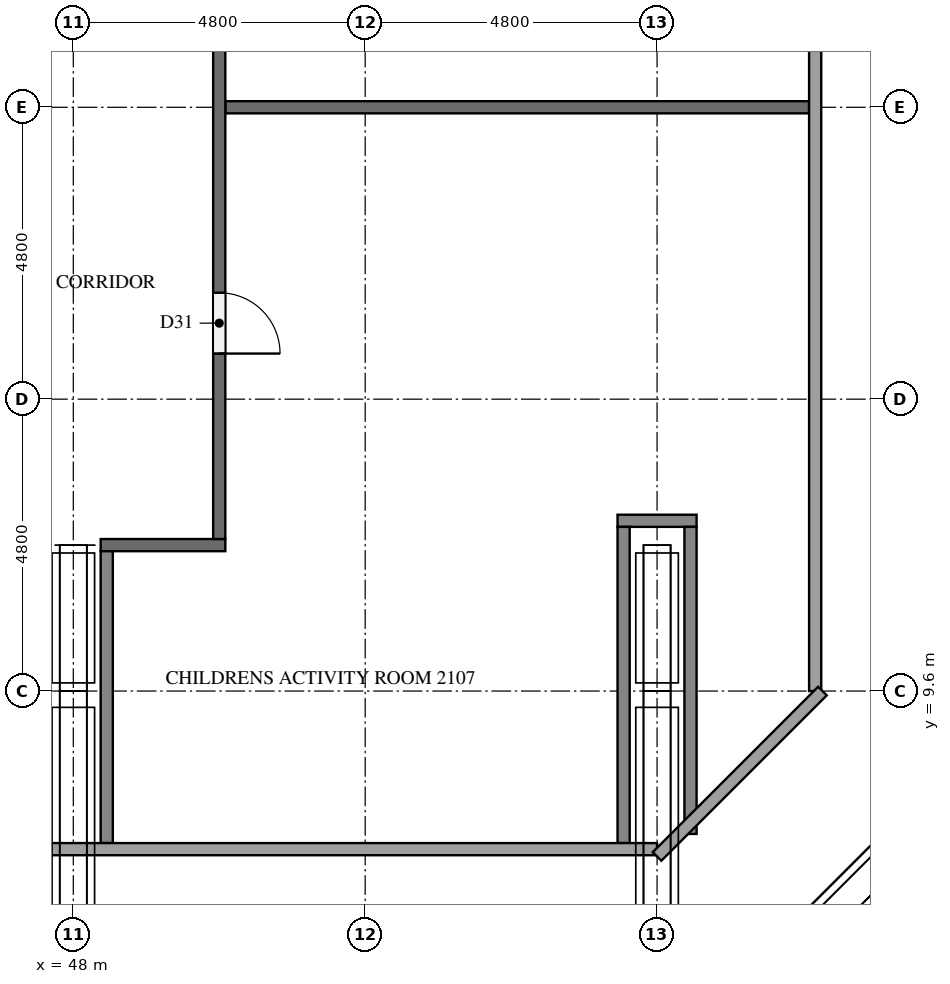
"""IFC4 building model, lengths in metres.
Left out: names, types, materials, properties, quantities, classifications, styles, units other than length and angle.
Written with IfcOpenShell. Run it as: python <this file> out.ifc"""

import sys

from ifc_helpers import new_model, si_unit, direction, frame, frame_2d, origin, place, context, subcontext, project, spatial, rectangle, extrude, element, fill, save


model = new_model("IFC4")
c1 = context("Model", 3, precision=1e-05, world=origin(), true_north=direction((0.0, 1.0)))
c2 = subcontext(c1, "Body", "Model", "MODEL_VIEW")
j1 = project(units=[si_unit("LENGTHUNIT", "METRE"), si_unit("PLANEANGLEUNIT", "RADIAN")], contexts=[c1])
p1 = place(None, origin())
s1 = spatial("IfcSite", under=j1, at=p1, CompositionType="ELEMENT")
p2 = place(p1, origin())
s2 = spatial("IfcBuilding", under=s1, at=p2, CompositionType="ELEMENT")
p3 = place(p2, frame((0.0, 0.0, 83.8)))
s3 = spatial("IfcBuildingStorey", under=s2, at=p3, CompositionType="ELEMENT", Elevation=83.8)
p4 = place(p3, frame((48.45, 12.0, 0.0), z_axis=(0.0, 0.0, 1.0), x_axis=(1.0, 0.0, 0.0)))
e1 = element("IfcWall", 1, at=p4, inside=s3, PredefinedType="PARTITIONING", context=c2, shape_type="SweptSolid", body=[
    extrude(rectangle(XDim=2.05, YDim=0.2, at=frame_2d((1.025, 0.0))), origin(), (0.0, 0.0, 1.0), 5.1),
])
p5 = place(p3, frame((56.95, 12.4, 0.0), z_axis=(0.0, 0.0, 1.0), x_axis=(1.0, 0.0, 0.0)))
e2 = element("IfcWall", 2, at=p5, inside=s3, PredefinedType="PARTITIONING", context=c2, shape_type="SweptSolid", body=[
    extrude(rectangle(XDim=1.3, YDim=0.2, at=frame_2d((0.65, 0.0))), origin(), (0.0, 0.0, 1.0), 5.1),
])
p6 = place(p3, frame((50.5, 19.2, 0.0), z_axis=(0.0, 0.0, 1.0), x_axis=(1.0, 0.0, 0.0)))
e3 = element("IfcWall", 3, at=p6, inside=s3, PredefinedType="PARTITIONING", context=c2, shape_type="SweptSolid", body=[
    extrude(rectangle(XDim=9.6, YDim=0.2, at=frame_2d((4.8, 0.0))), origin(), (0.0, 0.0, 1.0), 5.1),
])
p7 = place(p3, frame((48.55, 7.1, 0.0), z_axis=(0.0, 0.0, 1.0), x_axis=(0.0, 1.0, 0.0)))
e4 = element("IfcWall", 4, at=p7, inside=s3, PredefinedType="PARTITIONING", context=c2, shape_type="SweptSolid", body=[
    extrude(rectangle(XDim=4.8, YDim=0.2, at=frame_2d((2.4, 0.0))), origin(), (0.0, 0.0, 1.0), 5.1),
])
p8 = place(p3, frame((50.4, 40.7, 0.0), z_axis=(0.0, 0.0, 1.0), x_axis=(0.0, -1.0, 0.0)))
e5 = element("IfcWall", 5, at=p8, inside=s3, PredefinedType="PARTITIONING", context=c2, shape_type="SweptSolid", body=[
    extrude(rectangle(XDim=28.6, YDim=0.2, at=frame_2d((14.3, 0.0))), origin(), (0.0, 0.0, 1.0), 5.1),
])
p9 = place(p8, frame((24.55, 0.0, 0.0)))
e6 = element("IfcOpeningElement", 6, at=p9, cuts=e5, PredefinedType="OPENING", context=c2, shape_type="SweptSolid", body=[
    extrude(rectangle(XDim=1.0, YDim=2.1, at=frame_2d((0.5, 1.05))), frame((0.0, 0.11, 0.0), z_axis=(0.0, -1.0, 0.0), x_axis=(1.0, 0.0, 0.0)), (0.0, 0.0, 1.0), 0.22),
])
p10 = place(p8, frame((18.65, 0.0, 0.0)))
e7 = element("IfcOpeningElement", 7, at=p10, cuts=e5, PredefinedType="OPENING", context=c2, shape_type="SweptSolid", body=[
    extrude(rectangle(XDim=1.0, YDim=2.1, at=frame_2d((0.5, 1.05))), frame((0.0, 0.11, 0.0), z_axis=(0.0, -1.0, 0.0), x_axis=(1.0, 0.0, 0.0)), (0.0, 0.0, 1.0), 0.22),
])
p11 = place(p8, frame((13.85, 0.0, 0.0)))
e8 = element("IfcOpeningElement", 8, at=p11, cuts=e5, PredefinedType="OPENING", context=c2, shape_type="SweptSolid", body=[
    extrude(rectangle(XDim=1.0, YDim=2.1, at=frame_2d((0.5, 1.05))), frame((0.0, 0.11, 0.0), z_axis=(0.0, -1.0, 0.0), x_axis=(1.0, 0.0, 0.0)), (0.0, 0.0, 1.0), 0.22),
])
p12 = place(p8, frame((9.05, 0.0, 0.0)))
e9 = element("IfcOpeningElement", 9, at=p12, cuts=e5, PredefinedType="OPENING", context=c2, shape_type="SweptSolid", body=[
    extrude(rectangle(XDim=1.0, YDim=2.1, at=frame_2d((0.5, 1.05))), frame((0.0, 0.11, 0.0), z_axis=(0.0, -1.0, 0.0), x_axis=(1.0, 0.0, 0.0)), (0.0, 0.0, 1.0), 0.22),
])
p13 = place(p8, frame((3.05, 0.0, 0.0)))
e10 = element("IfcOpeningElement", 10, at=p13, cuts=e5, PredefinedType="OPENING", context=c2, shape_type="SweptSolid", body=[
    extrude(rectangle(XDim=1.0, YDim=2.1, at=frame_2d((0.5, 1.05))), frame((0.0, 0.11, 0.0), z_axis=(0.0, -1.0, 0.0), x_axis=(1.0, 0.0, 0.0)), (0.0, 0.0, 1.0), 0.22),
])
p14 = place(p3, frame((57.05, 7.1, 0.0), z_axis=(0.0, 0.0, 1.0), x_axis=(0.0, 1.0, 0.0)))
e11 = element("IfcWall", 11, at=p14, inside=s3, PredefinedType="PARTITIONING", context=c2, shape_type="SweptSolid", body=[
    extrude(rectangle(XDim=5.2, YDim=0.2, at=frame_2d((2.6, 0.0))), origin(), (0.0, 0.0, 1.0), 5.1),
])
p15 = place(p3, frame((58.15, 7.25, 0.0), z_axis=(0.0, 0.0, 1.0), x_axis=(0.0, 1.0, 0.0)))
e12 = element("IfcWall", 12, at=p15, inside=s3, PredefinedType="PARTITIONING", context=c2, shape_type="SweptSolid", body=[
    extrude(rectangle(XDim=5.05, YDim=0.2, at=frame_2d((2.525, 0.0))), origin(), (0.0, 0.0, 1.0), 5.1),
])
p16 = place(p9, origin())
e13 = element("IfcDoor", 13, at=p16, inside=s3, OperationType="SINGLE_SWING_RIGHT", PredefinedType="DOOR", context=c2, shape_type="SweptSolid", body=[
    extrude(rectangle(XDim=1.0, YDim=2.1, at=frame_2d((0.5, 1.05))), frame((0.0, 0.025, 0.0), z_axis=(0.0, -1.0, 0.0), x_axis=(1.0, 0.0, 0.0)), (0.0, 0.0, 1.0), 0.05),
])
fill(e6, e13)
save(model, sys.argv[1])
